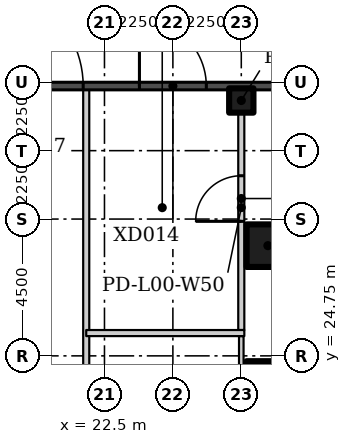
"""IFC4 building model, lengths in metres.
Left out: names, types, materials, properties, quantities, classifications, styles, units other than length and angle.
Written with IfcOpenShell. Run it as: python <this file> out.ifc"""

import sys

from ifc_helpers import new_model, si_unit, direction, frame, frame_2d, origin, origin_2d, place, context, subcontext, project, spatial, rectangle, hollow_rectangle, extrude, element, fill, save


model = new_model("IFC4")
c1 = context("Model", 3, precision=1e-05, world=origin(), true_north=direction((0.0, 1.0)))
c2 = subcontext(c1, "Body", "Model", "MODEL_VIEW")
j1 = project(units=[si_unit("LENGTHUNIT", "METRE"), si_unit("PLANEANGLEUNIT", "RADIAN")], contexts=[c1])
p1 = place(None, origin())
s1 = spatial("IfcSite", under=j1, at=p1, CompositionType="ELEMENT")
p2 = place(p1, origin())
s2 = spatial("IfcBuilding", under=s1, at=p2, CompositionType="ELEMENT")
p3 = place(p2, origin())
s3 = spatial("IfcBuildingStorey", under=s2, at=p3, CompositionType="ELEMENT", Elevation=0.0)
for number, where in (
    (1, (27.875, 23.875, 0.0)),
    (2, (27.875, 28.375, 0.0)),
):
    element("IfcColumn", number, at=place(p3, frame(where)), inside=s3, PredefinedType="COLUMN", context=c2, shape_type="SweptSolid", body=[
        extrude(hollow_rectangle(XDim=1.4, YDim=1.4, WallThickness=0.06, at=origin_2d()), origin(), (0.0, 0.0, 1.0), 6.1),
    ])
p4 = place(p3, frame((27.0, 33.15, 0.0)))
e3 = element("IfcColumn", 3, at=p4, inside=s3, PredefinedType="COLUMN", context=c2, shape_type="SweptSolid", body=[
    extrude(hollow_rectangle(XDim=0.8, YDim=0.8, WallThickness=0.03, at=origin_2d()), origin(), (0.0, 0.0, 1.0), 6.1),
])
p5 = place(p3, frame((21.9, 12.05, 0.0), z_axis=(0.0, 0.0, 1.0), x_axis=(0.0, 1.0, 0.0)))
e4 = element("IfcWall", 4, at=p5, inside=s3, PredefinedType="PARTITIONING", context=c2, shape_type="SweptSolid", body=[
    extrude(rectangle(XDim=21.605, YDim=0.2, at=frame_2d((10.802, 0.0))), origin(), (0.0, 0.0, 1.0), 6.1),
])
p6 = place(p3, frame((27.0, 25.4, 0.0), z_axis=(0.0, 0.0, 1.0), x_axis=(0.0, -1.0, 0.0)))
e5 = element("IfcWall", 5, at=p6, inside=s3, PredefinedType="PARTITIONING", context=c2, shape_type="SweptSolid", body=[
    extrude(rectangle(XDim=18.65, YDim=0.15, at=frame_2d((9.325, 0.0))), origin(), (0.0, 0.0, 1.0), 6.1),
])
p7 = place(p6, frame((8.375, 0.0, 0.0)))
e6 = element("IfcOpeningElement", 6, at=p7, cuts=e5, PredefinedType="OPENING", context=c2, shape_type="SweptSolid", body=[
    extrude(rectangle(XDim=1.8, YDim=2.4, at=frame_2d((0.9, 1.2))), frame((0.0, 0.085, 0.0), z_axis=(0.0, -1.0, 0.0), x_axis=(1.0, 0.0, 0.0)), (0.0, 0.0, 1.0), 0.17),
])
p8 = place(p3, frame((27.0, 25.6, 0.0), z_axis=(0.0, 0.0, 1.0), x_axis=(0.0, 1.0, 0.0)))
e7 = element("IfcWall", 7, at=p8, inside=s3, PredefinedType="PARTITIONING", context=c2, shape_type="SweptSolid", body=[
    extrude(rectangle(XDim=8.055, YDim=0.2, at=frame_2d((4.027, 0.0))), origin(), (0.0, 0.0, 1.0), 6.1),
])
p9 = place(p8, frame((3.575, 0.0, 0.0)))
e8 = element("IfcOpeningElement", 8, at=p9, cuts=e7, PredefinedType="OPENING", context=c2, shape_type="SweptSolid", body=[
    extrude(rectangle(XDim=1.5, YDim=2.4, at=frame_2d((0.75, 1.2))), frame((0.0, 0.11, 0.0), z_axis=(0.0, -1.0, 0.0), x_axis=(1.0, 0.0, 0.0)), (0.0, 0.0, 1.0), 0.22),
])
p10 = place(p3, frame((27.1, 25.5, 0.0), z_axis=(0.0, 0.0, 1.0), x_axis=(-1.0, 0.0, 0.0)))
e9 = element("IfcWall", 9, at=p10, inside=s3, PredefinedType="PARTITIONING", context=c2, shape_type="SweptSolid", body=[
    extrude(rectangle(XDim=5.2, YDim=0.2, at=frame_2d((2.6, 0.0))), origin(), (0.0, 0.0, 1.0), 6.1),
])
p11 = place(p3, frame((-67.5, 33.625, 0.0)))
e10 = element("IfcWall", 10, at=p11, inside=s3, PredefinedType="SOLIDWALL", context=c2, shape_type="SweptSolid", body=[
    extrude(rectangle(XDim=130.5, YDim=0.25, at=frame_2d((65.25, 0.0))), origin(), (0.0, 0.0, 1.0), 6.15),
])
p12 = place(p11, frame((28.65, 0.0, 0.0)))
e11 = element("IfcOpeningElement", 11, at=p12, cuts=e10, PredefinedType="OPENING", context=c2, shape_type="SweptSolid", body=[
    extrude(rectangle(XDim=1.2, YDim=2.4, at=frame_2d((0.6, 1.2))), frame((0.0, 0.135, 0.0), z_axis=(0.0, -1.0, 0.0), x_axis=(1.0, 0.0, 0.0)), (0.0, 0.0, 1.0), 0.27),
])
p13 = place(p11, frame((37.25, 0.0, 0.0)))
e12 = element("IfcOpeningElement", 12, at=p13, cuts=e10, PredefinedType="OPENING", context=c2, shape_type="SweptSolid", body=[
    extrude(rectangle(XDim=2.0, YDim=2.4, at=frame_2d((1.0, 1.2))), frame((0.0, 0.135, 0.0), z_axis=(0.0, -1.0, 0.0), x_axis=(1.0, 0.0, 0.0)), (0.0, 0.0, 1.0), 0.27),
])
p14 = place(p11, frame((100.25, 0.0, 0.0)))
e13 = element("IfcOpeningElement", 13, at=p14, cuts=e10, PredefinedType="OPENING", context=c2, shape_type="SweptSolid", body=[
    extrude(rectangle(XDim=2.0, YDim=2.4, at=frame_2d((1.0, 1.2))), frame((0.0, 0.135, 0.0), z_axis=(0.0, -1.0, 0.0), x_axis=(1.0, 0.0, 0.0)), (0.0, 0.0, 1.0), 0.27),
])
p15 = place(p11, frame((55.25, 0.0, 0.0)))
e14 = element("IfcOpeningElement", 14, at=p15, cuts=e10, PredefinedType="OPENING", context=c2, shape_type="SweptSolid", body=[
    extrude(rectangle(XDim=2.0, YDim=2.4, at=frame_2d((1.0, 1.2))), frame((0.0, 0.135, 0.0), z_axis=(0.0, -1.0, 0.0), x_axis=(1.0, 0.0, 0.0)), (0.0, 0.0, 1.0), 0.27),
])
p16 = place(p11, frame((68.75, 0.0, 0.0)))
e15 = element("IfcOpeningElement", 15, at=p16, cuts=e10, PredefinedType="OPENING", context=c2, shape_type="SweptSolid", body=[
    extrude(rectangle(XDim=2.0, YDim=2.4, at=frame_2d((1.0, 1.2))), frame((0.0, 0.135, 0.0), z_axis=(0.0, -1.0, 0.0), x_axis=(1.0, 0.0, 0.0)), (0.0, 0.0, 1.0), 0.27),
])
p17 = place(p11, frame((10.25, 0.0, 0.0)))
e16 = element("IfcOpeningElement", 16, at=p17, cuts=e10, PredefinedType="OPENING", context=c2, shape_type="SweptSolid", body=[
    extrude(rectangle(XDim=2.0, YDim=2.4, at=frame_2d((1.0, 1.2))), frame((0.0, 0.135, 0.0), z_axis=(0.0, -1.0, 0.0), x_axis=(1.0, 0.0, 0.0)), (0.0, 0.0, 1.0), 0.27),
])
p18 = place(p11, frame((5.65, 0.0, 0.0)))
e17 = element("IfcOpeningElement", 17, at=p18, cuts=e10, PredefinedType="OPENING", context=c2, shape_type="SweptSolid", body=[
    extrude(rectangle(XDim=2.2, YDim=2.4, at=frame_2d((1.1, 1.2))), frame((0.0, 0.135, 0.0), z_axis=(0.0, -1.0, 0.0), x_axis=(1.0, 0.0, 0.0)), (0.0, 0.0, 1.0), 0.27),
])
p19 = place(p11, frame((113.65, 0.0, 0.0)))
e18 = element("IfcOpeningElement", 18, at=p19, cuts=e10, PredefinedType="OPENING", context=c2, shape_type="SweptSolid", body=[
    extrude(rectangle(XDim=2.2, YDim=2.4, at=frame_2d((1.1, 1.2))), frame((0.0, 0.135, 0.0), z_axis=(0.0, -1.0, 0.0), x_axis=(1.0, 0.0, 0.0)), (0.0, 0.0, 1.0), 0.27),
])
p20 = place(p11, frame((45.45, 0.0, 0.0)))
e19 = element("IfcOpeningElement", 19, at=p20, cuts=e10, PredefinedType="OPENING", context=c2, shape_type="SweptSolid", body=[
    extrude(rectangle(XDim=3.6, YDim=4.5, at=frame_2d((1.8, 2.25))), frame((0.0, 0.135, 0.0), z_axis=(0.0, -1.0, 0.0), x_axis=(1.0, 0.0, 0.0)), (0.0, 0.0, 1.0), 0.27),
])
p21 = place(p11, frame((91.15, 0.0, 0.0)))
e20 = element("IfcOpeningElement", 20, at=p21, cuts=e10, PredefinedType="OPENING", context=c2, shape_type="SweptSolid", body=[
    extrude(rectangle(XDim=2.2, YDim=2.4, at=frame_2d((1.1, 1.2))), frame((0.0, 0.135, 0.0), z_axis=(0.0, -1.0, 0.0), x_axis=(1.0, 0.0, 0.0)), (0.0, 0.0, 1.0), 0.27),
])
p22 = place(p11, frame((23.0, 0.0, 0.0)))
e21 = element("IfcOpeningElement", 21, at=p22, cuts=e10, PredefinedType="OPENING", context=c2, shape_type="SweptSolid", body=[
    extrude(rectangle(XDim=3.3, YDim=2.4, at=frame_2d((1.65, 1.2))), frame((0.0, 0.135, 0.0), z_axis=(0.0, -1.0, 0.0), x_axis=(1.0, 0.0, 0.0)), (0.0, 0.0, 1.0), 0.27),
])
p23 = place(p11, frame((59.0, 0.0, 0.0)))
e22 = element("IfcOpeningElement", 22, at=p23, cuts=e10, PredefinedType="OPENING", context=c2, shape_type="SweptSolid", body=[
    extrude(rectangle(XDim=3.3, YDim=2.4, at=frame_2d((1.65, 1.2))), frame((0.0, 0.135, 0.0), z_axis=(0.0, -1.0, 0.0), x_axis=(1.0, 0.0, 0.0)), (0.0, 0.0, 1.0), 0.27),
])
p24 = place(p11, frame((86.0, 0.0, 0.0)))
e23 = element("IfcOpeningElement", 23, at=p24, cuts=e10, PredefinedType="OPENING", context=c2, shape_type="SweptSolid", body=[
    extrude(rectangle(XDim=3.3, YDim=2.4, at=frame_2d((1.65, 1.2))), frame((0.0, 0.135, 0.0), z_axis=(0.0, -1.0, 0.0), x_axis=(1.0, 0.0, 0.0)), (0.0, 0.0, 1.0), 0.27),
])
p25 = place(p11, frame((122.0, 0.0, 0.0)))
e24 = element("IfcOpeningElement", 24, at=p25, cuts=e10, PredefinedType="OPENING", context=c2, shape_type="SweptSolid", body=[
    extrude(rectangle(XDim=3.3, YDim=2.4, at=frame_2d((1.65, 1.2))), frame((0.0, 0.135, 0.0), z_axis=(0.0, -1.0, 0.0), x_axis=(1.0, 0.0, 0.0)), (0.0, 0.0, 1.0), 0.27),
])
p26 = place(p11, frame((127.05, 0.0, 3.0)))
e25 = element("IfcOpeningElement", 25, at=p26, cuts=e10, PredefinedType="OPENING", context=c2, shape_type="SweptSolid", body=[
    extrude(rectangle(XDim=2.4, YDim=1.2, at=frame_2d((1.2, 0.6))), frame((0.0, 0.135, 0.0), z_axis=(0.0, -1.0, 0.0), x_axis=(1.0, 0.0, 0.0)), (0.0, 0.0, 1.0), 0.27),
])
p27 = place(p11, frame((118.05, 0.0, 3.0)))
e26 = element("IfcOpeningElement", 26, at=p27, cuts=e10, PredefinedType="OPENING", context=c2, shape_type="SweptSolid", body=[
    extrude(rectangle(XDim=2.4, YDim=1.2, at=frame_2d((1.2, 0.6))), frame((0.0, 0.135, 0.0), z_axis=(0.0, -1.0, 0.0), x_axis=(1.0, 0.0, 0.0)), (0.0, 0.0, 1.0), 0.27),
])
p28 = place(p11, frame((109.05, 0.0, 3.0)))
e27 = element("IfcOpeningElement", 27, at=p28, cuts=e10, PredefinedType="OPENING", context=c2, shape_type="SweptSolid", body=[
    extrude(rectangle(XDim=2.4, YDim=1.2, at=frame_2d((1.2, 0.6))), frame((0.0, 0.135, 0.0), z_axis=(0.0, -1.0, 0.0), x_axis=(1.0, 0.0, 0.0)), (0.0, 0.0, 1.0), 0.27),
])
p29 = place(p11, frame((104.55, 0.0, 3.0)))
e28 = element("IfcOpeningElement", 28, at=p29, cuts=e10, PredefinedType="OPENING", context=c2, shape_type="SweptSolid", body=[
    extrude(rectangle(XDim=2.4, YDim=1.2, at=frame_2d((1.2, 0.6))), frame((0.0, 0.135, 0.0), z_axis=(0.0, -1.0, 0.0), x_axis=(1.0, 0.0, 0.0)), (0.0, 0.0, 1.0), 0.27),
])
p30 = place(p11, frame((95.55, 0.0, 3.0)))
e29 = element("IfcOpeningElement", 29, at=p30, cuts=e10, PredefinedType="OPENING", context=c2, shape_type="SweptSolid", body=[
    extrude(rectangle(XDim=2.4, YDim=1.2, at=frame_2d((1.2, 0.6))), frame((0.0, 0.135, 0.0), z_axis=(0.0, -1.0, 0.0), x_axis=(1.0, 0.0, 0.0)), (0.0, 0.0, 1.0), 0.27),
])
p31 = place(p11, frame((82.05, 0.0, 3.0)))
e30 = element("IfcOpeningElement", 30, at=p31, cuts=e10, PredefinedType="OPENING", context=c2, shape_type="SweptSolid", body=[
    extrude(rectangle(XDim=2.4, YDim=1.2, at=frame_2d((1.2, 0.6))), frame((0.0, 0.135, 0.0), z_axis=(0.0, -1.0, 0.0), x_axis=(1.0, 0.0, 0.0)), (0.0, 0.0, 1.0), 0.27),
])
p32 = place(p11, frame((77.55, 0.0, 3.0)))
e31 = element("IfcOpeningElement", 31, at=p32, cuts=e10, PredefinedType="OPENING", context=c2, shape_type="SweptSolid", body=[
    extrude(rectangle(XDim=2.4, YDim=1.2, at=frame_2d((1.2, 0.6))), frame((0.0, 0.135, 0.0), z_axis=(0.0, -1.0, 0.0), x_axis=(1.0, 0.0, 0.0)), (0.0, 0.0, 1.0), 0.27),
])
p33 = place(p11, frame((73.05, 0.0, 3.0)))
e32 = element("IfcOpeningElement", 32, at=p33, cuts=e10, PredefinedType="OPENING", context=c2, shape_type="SweptSolid", body=[
    extrude(rectangle(XDim=2.4, YDim=1.2, at=frame_2d((1.2, 0.6))), frame((0.0, 0.135, 0.0), z_axis=(0.0, -1.0, 0.0), x_axis=(1.0, 0.0, 0.0)), (0.0, 0.0, 1.0), 0.27),
])
p34 = place(p11, frame((64.05, 0.0, 3.0)))
e33 = element("IfcOpeningElement", 33, at=p34, cuts=e10, PredefinedType="OPENING", context=c2, shape_type="SweptSolid", body=[
    extrude(rectangle(XDim=2.4, YDim=1.2, at=frame_2d((1.2, 0.6))), frame((0.0, 0.135, 0.0), z_axis=(0.0, -1.0, 0.0), x_axis=(1.0, 0.0, 0.0)), (0.0, 0.0, 1.0), 0.27),
])
p35 = place(p11, frame((50.55, 0.0, 3.0)))
e34 = element("IfcOpeningElement", 34, at=p35, cuts=e10, PredefinedType="OPENING", context=c2, shape_type="SweptSolid", body=[
    extrude(rectangle(XDim=2.4, YDim=1.2, at=frame_2d((1.2, 0.6))), frame((0.0, 0.135, 0.0), z_axis=(0.0, -1.0, 0.0), x_axis=(1.0, 0.0, 0.0)), (0.0, 0.0, 1.0), 0.27),
])
p36 = place(p11, frame((41.55, 0.0, 3.0)))
e35 = element("IfcOpeningElement", 35, at=p36, cuts=e10, PredefinedType="OPENING", context=c2, shape_type="SweptSolid", body=[
    extrude(rectangle(XDim=2.4, YDim=1.2, at=frame_2d((1.2, 0.6))), frame((0.0, 0.135, 0.0), z_axis=(0.0, -1.0, 0.0), x_axis=(1.0, 0.0, 0.0)), (0.0, 0.0, 1.0), 0.27),
])
p37 = place(p11, frame((32.55, 0.0, 3.0)))
e36 = element("IfcOpeningElement", 36, at=p37, cuts=e10, PredefinedType="OPENING", context=c2, shape_type="SweptSolid", body=[
    extrude(rectangle(XDim=2.4, YDim=1.2, at=frame_2d((1.2, 0.6))), frame((0.0, 0.135, 0.0), z_axis=(0.0, -1.0, 0.0), x_axis=(1.0, 0.0, 0.0)), (0.0, 0.0, 1.0), 0.27),
])
p38 = place(p11, frame((19.05, 0.0, 3.0)))
e37 = element("IfcOpeningElement", 37, at=p38, cuts=e10, PredefinedType="OPENING", context=c2, shape_type="SweptSolid", body=[
    extrude(rectangle(XDim=2.4, YDim=1.2, at=frame_2d((1.2, 0.6))), frame((0.0, 0.135, 0.0), z_axis=(0.0, -1.0, 0.0), x_axis=(1.0, 0.0, 0.0)), (0.0, 0.0, 1.0), 0.27),
])
p39 = place(p11, frame((14.55, 0.0, 3.0)))
e38 = element("IfcOpeningElement", 38, at=p39, cuts=e10, PredefinedType="OPENING", context=c2, shape_type="SweptSolid", body=[
    extrude(rectangle(XDim=2.4, YDim=1.2, at=frame_2d((1.2, 0.6))), frame((0.0, 0.135, 0.0), z_axis=(0.0, -1.0, 0.0), x_axis=(1.0, 0.0, 0.0)), (0.0, 0.0, 1.0), 0.27),
])
p40 = place(p11, frame((1.05, 0.0, 3.0)))
e39 = element("IfcOpeningElement", 39, at=p40, cuts=e10, PredefinedType="OPENING", context=c2, shape_type="SweptSolid", body=[
    extrude(rectangle(XDim=2.4, YDim=1.2, at=frame_2d((1.2, 0.6))), frame((0.0, 0.135, 0.0), z_axis=(0.0, -1.0, 0.0), x_axis=(1.0, 0.0, 0.0)), (0.0, 0.0, 1.0), 0.27),
])
p41 = place(p9, origin())
e40 = element("IfcDoor", 40, at=p41, inside=s3, OperationType="DOUBLE_DOOR_SINGLE_SWING", PredefinedType="DOOR", context=c2, shape_type="SweptSolid", body=[
    extrude(rectangle(XDim=1.5, YDim=2.4, at=frame_2d((0.75, 1.2))), frame((0.0, 0.025, 0.0), z_axis=(0.0, -1.0, 0.0), x_axis=(1.0, 0.0, 0.0)), (0.0, 0.0, 1.0), 0.05),
])
fill(e8, e40)
p42 = place(p21, origin())
e41 = element("IfcDoor", 41, at=p42, inside=s3, OperationType="DOUBLE_DOOR_SINGLE_SWING", PredefinedType="DOOR", context=c2, shape_type="SweptSolid", body=[
    extrude(rectangle(XDim=2.2, YDim=2.4, at=frame_2d((1.1, 1.2))), frame((0.0, 0.025, 0.0), z_axis=(0.0, -1.0, 0.0), x_axis=(1.0, 0.0, 0.0)), (0.0, 0.0, 1.0), 0.05),
])
fill(e20, e41)
p43 = place(p24, origin())
e42 = element("IfcDoor", 42, at=p43, inside=s3, OperationType="DOUBLE_DOOR_SINGLE_SWING", PredefinedType="DOOR", context=c2, shape_type="SweptSolid", body=[
    extrude(rectangle(XDim=3.3, YDim=2.4, at=frame_2d((1.65, 1.2))), frame((0.0, 0.025, 0.0), z_axis=(0.0, -1.0, 0.0), x_axis=(1.0, 0.0, 0.0)), (0.0, 0.0, 1.0), 0.05),
])
fill(e23, e42)
save(model, sys.argv[1])
